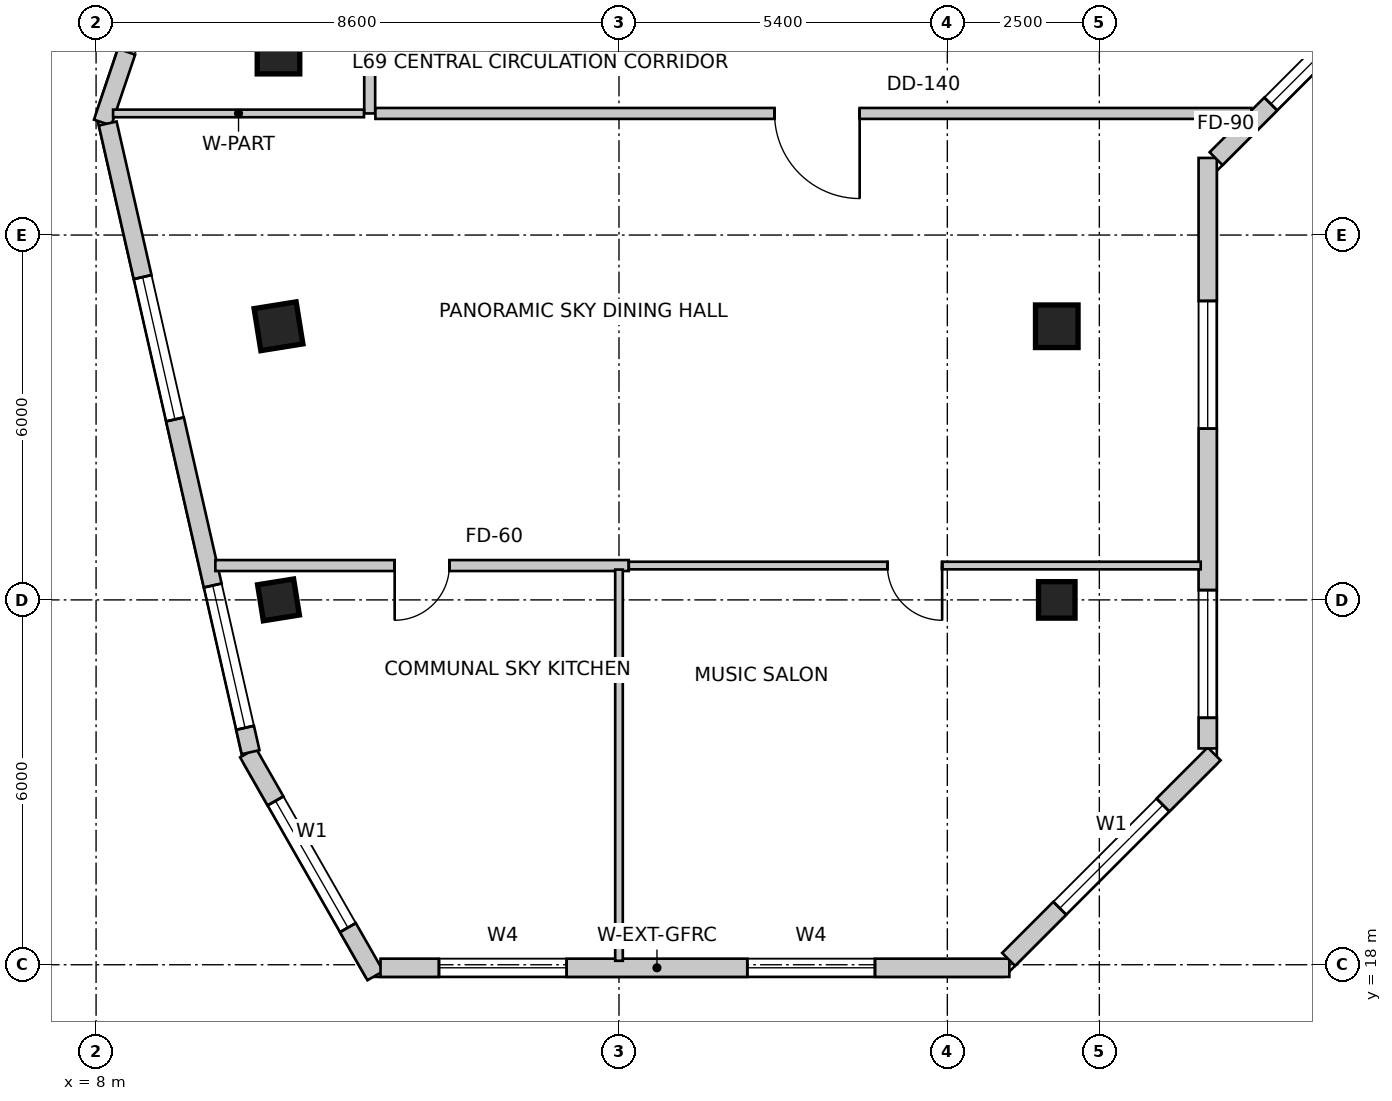
"""IFC4 building model, lengths in metres.
Left out: names, types, materials, properties, quantities, classifications, styles, units other than length and angle.
Written with IfcOpenShell. Run it as: python <this file> out.ifc"""

import sys

from ifc_helpers import new_model, si_unit, direction, frame, frame_2d, origin, origin_2d, place, context, subcontext, project, spatial, rectangle, extrude, source, transform, mapped, element, fill, save


model = new_model("IFC4")
c1 = context("Model", 3, precision=1e-05, world=origin(), true_north=direction((0.0, 1.0)))
c2 = subcontext(c1, "Body", "Model", "MODEL_VIEW")
j1 = project(units=[si_unit("LENGTHUNIT", "METRE"), si_unit("PLANEANGLEUNIT", "RADIAN")], contexts=[c1])
p1 = place(None, origin())
s1 = spatial("IfcSite", under=j1, at=p1, CompositionType="ELEMENT")
p2 = place(p1, origin())
s2 = spatial("IfcBuilding", under=s1, at=p2, CompositionType="ELEMENT")
p3 = place(p2, frame((0.0, 0.0, 270.9)))
s3 = spatial("IfcBuildingStorey", under=s2, at=p3, CompositionType="ELEMENT", Elevation=270.9)
m1 = source(origin(), c2, "Body", "SweptSolid", [
    extrude(rectangle(XDim=0.7, YDim=0.7, at=origin_2d()), origin(), (0.0, 0.0, 1.0), 3.6),
])
for number, where, z_axis, x_axis in (
    (1, (11.0, 33.0, 0.0), (0.0, 0.0, 1.0), (1.0, 0.0, 0.0)),
    (2, (11.0, 28.5, 0.0), (0.0, 0.0, 1.0), (0.158, -0.987, 0.0)),
):
    element("IfcColumn", number, at=place(p3, frame(where, z_axis=z_axis, x_axis=x_axis)), inside=s3, PredefinedType="COLUMN", context=c2, shape_type="MappedRepresentation", body=[
        mapped(m1, transform((0.0, 0.0, 0.0), scale=1.0)),
    ])
m2 = source(origin(), c2, "Body", "SweptSolid", [
    extrude(rectangle(XDim=0.6, YDim=0.6, at=origin_2d()), origin(), (0.0, 0.0, 1.0), 3.6),
])
p4 = place(p3, frame((11.0, 24.0, 0.0), z_axis=(0.0, 0.0, 1.0), x_axis=(0.158158067254, -0.987413806751, 0.0)))
e3 = element("IfcColumn", 3, at=p4, inside=s3, PredefinedType="COLUMN", context=c2, shape_type="MappedRepresentation", body=[
    mapped(m2, transform((0.0, 0.0, 0.0), scale=1.0)),
])
p5 = place(p3, frame((23.8, 28.5, 0.0), z_axis=(0.0, 0.0, 1.0), x_axis=(1.0, 0.0, 0.0)))
e4 = element("IfcColumn", 4, at=p5, inside=s3, PredefinedType="COLUMN", context=c2, shape_type="MappedRepresentation", body=[
    mapped(m1, transform((0.0, 0.0, 0.0), scale=1.0)),
])
p6 = place(p3, frame((23.8, 24.0, 0.0), z_axis=(0.0, 0.0, 1.0), x_axis=(1.0, 0.0, 0.0)))
e5 = element("IfcColumn", 5, at=p6, inside=s3, PredefinedType="COLUMN", context=c2, shape_type="MappedRepresentation", body=[
    mapped(m2, transform((0.0, 0.0, 0.0), scale=1.0)),
])
p7 = place(p3, frame((10.499, 21.485, 0.0), z_axis=(0.0, 0.0, 1.0), x_axis=(0.496163848656, -0.868228907194, 0.0)))
e6 = element("IfcWall", 6, at=p7, inside=s3, PredefinedType="SOLIDWALL", context=c2, shape_type="SweptSolid", body=[
    extrude(rectangle(XDim=4.222, YDim=0.3, at=frame_2d((2.111, 0.0))), origin(), (0.0, 0.0, 1.0), 3.35),
])
m3 = source(origin(), c2, "Body", "SweptSolid", [
    extrude(rectangle(XDim=2.4, YDim=2.2, at=frame_2d((1.2, 1.1))), frame((0.0, 0.16, 0.0), z_axis=(0.0, -1.0, 0.0), x_axis=(1.0, 0.0, 0.0)), (0.0, 0.0, 1.0), 0.32),
])
p8 = place(p7, frame((0.911, 0.0, 0.85)))
e7 = element("IfcOpeningElement", 7, at=p8, cuts=e6, PredefinedType="OPENING", context=c2, shape_type="MappedRepresentation", body=[
    mapped(m3, transform((0.0, 0.0, 0.0), scale=1.0)),
])
p9 = place(p3, frame((12.678, 17.95, 0.0), z_axis=(0.0, 0.0, 1.0), x_axis=(1.0, 0.0, 0.0)))
e8 = element("IfcWall", 8, at=p9, inside=s3, PredefinedType="SOLIDWALL", context=c2, shape_type="SweptSolid", body=[
    extrude(rectangle(XDim=10.342, YDim=0.3, at=frame_2d((5.171, 0.0))), origin(), (0.0, 0.0, 1.0), 3.35),
])
m4 = source(origin(), c2, "Body", "SweptSolid", [
    extrude(rectangle(XDim=2.1, YDim=2.0, at=frame_2d((1.05, 1.0))), frame((0.0, 0.16, 0.0), z_axis=(0.0, -1.0, 0.0), x_axis=(1.0, 0.0, 0.0)), (0.0, 0.0, 1.0), 0.32),
])
p10 = place(p9, frame((0.961, 0.0, 0.85)))
e9 = element("IfcOpeningElement", 9, at=p10, cuts=e8, PredefinedType="OPENING", context=c2, shape_type="MappedRepresentation", body=[
    mapped(m4, transform((0.0, 0.0, 0.0), scale=1.0)),
])
p11 = place(p9, frame((6.032, 0.0, 0.85)))
e10 = element("IfcOpeningElement", 10, at=p11, cuts=e8, PredefinedType="OPENING", context=c2, shape_type="MappedRepresentation", body=[
    mapped(m4, transform((0.0, 0.0, 0.0), scale=1.0)),
])
p12 = place(p3, frame((23.008, 18.088, 0.0), z_axis=(0.0, 0.0, 1.0), x_axis=(0.707106781187, 0.707106781187, 0.0)))
e11 = element("IfcWall", 11, at=p12, inside=s3, PredefinedType="SOLIDWALL", context=c2, shape_type="SweptSolid", body=[
    extrude(rectangle(XDim=4.781, YDim=0.3, at=frame_2d((2.39, 0.0))), origin(), (0.0, 0.0, 1.0), 3.35),
])
p13 = place(p12, frame((1.19, 0.0, 0.85)))
e12 = element("IfcOpeningElement", 12, at=p13, cuts=e11, PredefinedType="OPENING", context=c2, shape_type="MappedRepresentation", body=[
    mapped(m3, transform((0.0, 0.0, 0.0), scale=1.0)),
])
p14 = place(p3, frame((26.282, 21.557, 0.0), z_axis=(0.0, 0.0, 1.0), x_axis=(0.0, 1.0, 0.0)))
e13 = element("IfcWall", 13, at=p14, inside=s3, PredefinedType="SOLIDWALL", context=c2, shape_type="SweptSolid", body=[
    extrude(rectangle(XDim=9.711, YDim=0.3, at=frame_2d((4.855, 0.0))), origin(), (0.0, 0.0, 1.0), 3.35),
])
p15 = place(p14, frame((0.504, 0.0, 0.85)))
e14 = element("IfcOpeningElement", 14, at=p15, cuts=e13, PredefinedType="OPENING", context=c2, shape_type="MappedRepresentation", body=[
    mapped(m4, transform((0.0, 0.0, 0.0), scale=1.0)),
])
p16 = place(p14, frame((5.259, 0.0, 0.85)))
e15 = element("IfcOpeningElement", 15, at=p16, cuts=e13, PredefinedType="OPENING", context=c2, shape_type="MappedRepresentation", body=[
    mapped(m4, transform((0.0, 0.0, 0.0), scale=1.0)),
])
p17 = place(p3, frame((26.42, 31.256, 0.0), z_axis=(0.0, 0.0, 1.0), x_axis=(0.707106781187, 0.707106781187, 0.0)))
e16 = element("IfcWall", 16, at=p17, inside=s3, PredefinedType="SOLIDWALL", context=c2, shape_type="SweptSolid", body=[
    extrude(rectangle(XDim=2.907, YDim=0.3, at=frame_2d((1.454, 0.0))), origin(), (0.0, 0.0, 1.0), 3.35),
])
m5 = source(origin(), c2, "Body", "SweptSolid", [
    extrude(rectangle(XDim=1.2, YDim=1.6, at=frame_2d((0.6, 0.8))), frame((0.0, 0.16, 0.0), z_axis=(0.0, -1.0, 0.0), x_axis=(1.0, 0.0, 0.0)), (0.0, 0.0, 1.0), 0.32),
])
p18 = place(p17, frame((1.272, 0.0, 0.85)))
e17 = element("IfcOpeningElement", 17, at=p18, cuts=e16, PredefinedType="OPENING", context=c2, shape_type="MappedRepresentation", body=[
    mapped(m5, transform((0.0, 0.0, 0.0), scale=1.0)),
])
p19 = place(p3, frame((8.501, 33.015, 0.0), z_axis=(0.0, 0.0, 1.0), x_axis=(-0.319916718913, -0.94744566755, 0.0)))
e18 = element("IfcWall", 18, at=p19, inside=s3, PredefinedType="SOLIDWALL", context=c2, shape_type="SweptSolid", body=[
    extrude(rectangle(XDim=1.23, YDim=0.3, at=frame_2d((0.615, 0.0))), origin(), (0.0, 0.0, 1.0), 3.35),
])
p20 = place(p3, frame((8.191, 31.834, 0.0), z_axis=(0.0, 0.0, 1.0), x_axis=(0.221636032737, -0.975129462683, 0.0)))
e19 = element("IfcWall", 19, at=p20, inside=s3, PredefinedType="SOLIDWALL", context=c2, shape_type="SweptSolid", body=[
    extrude(rectangle(XDim=10.602, YDim=0.3, at=frame_2d((5.301, 0.0))), origin(), (0.0, 0.0, 1.0), 3.35),
])
p21 = place(p20, frame((2.59, 0.0, 0.85)))
e20 = element("IfcOpeningElement", 20, at=p21, cuts=e19, PredefinedType="OPENING", context=c2, shape_type="MappedRepresentation", body=[
    mapped(m3, transform((0.0, 0.0, 0.0), scale=1.0)),
])
p22 = place(p20, frame((7.791, 0.0, 0.85)))
e21 = element("IfcOpeningElement", 21, at=p22, cuts=e19, PredefinedType="OPENING", context=c2, shape_type="MappedRepresentation", body=[
    mapped(m3, transform((0.0, 0.0, 0.0), scale=1.0)),
])
p23 = place(p3, frame((12.5, 32.0, 0.0), z_axis=(0.0, 0.0, 1.0), x_axis=(0.0, 1.0, 0.0)))
e22 = element("IfcWall", 22, at=p23, inside=s3, PredefinedType="PARTITIONING", context=c2, shape_type="SweptSolid", body=[
    extrude(rectangle(XDim=1.556, YDim=0.18, at=frame_2d((0.778, 0.0))), origin(), (0.0, 0.0, 1.0), 2.935),
])
p24 = place(p3, frame((27.001, 32.0, 0.0), z_axis=(0.0, 0.0, 1.0), x_axis=(-1.0, 0.0, 0.0)))
e23 = element("IfcWall", 23, at=p24, inside=s3, PredefinedType="PARTITIONING", context=c2, shape_type="SweptSolid", body=[
    extrude(rectangle(XDim=14.407, YDim=0.18, at=frame_2d((7.204, 0.0))), origin(), (0.0, 0.0, 1.0), 2.935),
])
m6 = source(origin(), c2, "Body", "SweptSolid", [
    extrude(rectangle(XDim=1.4, YDim=2.15, at=frame_2d((0.7, 1.075))), frame((0.0, 0.1, 0.0), z_axis=(0.0, -1.0, 0.0), x_axis=(1.0, 0.0, 0.0)), (0.0, 0.0, 1.0), 0.2),
])
p25 = place(p24, frame((6.443, 0.0, 0.0)))
e24 = element("IfcOpeningElement", 24, at=p25, cuts=e23, PredefinedType="OPENING", context=c2, shape_type="MappedRepresentation", body=[
    mapped(m6, transform((0.0, 0.0, 0.0), scale=1.0)),
])
p26 = place(p3, frame((12.406, 32.0, 0.0), z_axis=(0.0, 0.0, 1.0), x_axis=(-1.0, 0.0, 0.0)))
e25 = element("IfcWall", 25, at=p26, inside=s3, PredefinedType="PARTITIONING", context=c2, shape_type="SweptSolid", body=[
    extrude(rectangle(XDim=4.126, YDim=0.125, at=frame_2d((2.063, 0.0))), origin(), (0.0, 0.0, 1.0), 2.642),
])
p27 = place(p3, frame((16.76, 24.565, 0.0), z_axis=(0.0, 0.0, 1.0), x_axis=(-1.0, 0.0, 0.0)))
e26 = element("IfcWall", 26, at=p27, inside=s3, PredefinedType="PARTITIONING", context=c2, shape_type="SweptSolid", body=[
    extrude(rectangle(XDim=6.798, YDim=0.18, at=frame_2d((3.399, 0.0))), origin(), (0.0, 0.0, 1.0), 2.642),
])
m7 = source(origin(), c2, "Body", "SweptSolid", [
    extrude(rectangle(XDim=0.9, YDim=2.15, at=frame_2d((0.45, 1.075))), frame((0.0, 0.1, 0.0), z_axis=(0.0, -1.0, 0.0), x_axis=(1.0, 0.0, 0.0)), (0.0, 0.0, 1.0), 0.2),
])
p28 = place(p27, frame((2.949, 0.0, 0.0)))
e27 = element("IfcOpeningElement", 27, at=p28, cuts=e26, PredefinedType="OPENING", context=c2, shape_type="MappedRepresentation", body=[
    mapped(m7, transform((0.0, 0.0, 0.0), scale=1.0)),
])
p29 = place(p3, frame((26.167, 24.565, 0.0), z_axis=(0.0, 0.0, 1.0), x_axis=(-1.0, 0.0, 0.0)))
e28 = element("IfcWall", 28, at=p29, inside=s3, PredefinedType="PARTITIONING", context=c2, shape_type="SweptSolid", body=[
    extrude(rectangle(XDim=9.405, YDim=0.125, at=frame_2d((4.703, 0.0))), origin(), (0.0, 0.0, 1.0), 2.642),
])
m8 = source(origin(), c2, "Body", "SweptSolid", [
    extrude(rectangle(XDim=0.9, YDim=2.15, at=frame_2d((0.45, 1.075))), frame((0.0, 0.073, 0.0), z_axis=(0.0, -1.0, 0.0), x_axis=(1.0, 0.0, 0.0)), (0.0, 0.0, 1.0), 0.145),
])
p30 = place(p29, frame((4.252, 0.0, 0.0)))
e29 = element("IfcOpeningElement", 29, at=p30, cuts=e28, PredefinedType="OPENING", context=c2, shape_type="MappedRepresentation", body=[
    mapped(m8, transform((0.0, 0.0, 0.0), scale=1.0)),
])
p31 = place(p3, frame((16.6, 24.499, 0.0), z_axis=(0.0, 0.0, 1.0), x_axis=(0.0, -1.0, 0.0)))
e30 = element("IfcWall", 30, at=p31, inside=s3, PredefinedType="PARTITIONING", context=c2, shape_type="SweptSolid", body=[
    extrude(rectangle(XDim=6.434, YDim=0.125, at=frame_2d((3.217, 0.0))), origin(), (0.0, 0.0, 1.0), 2.979),
])
m9 = source(origin(), c2, "Body", "SweptSolid", [
    extrude(rectangle(XDim=2.4, YDim=2.2, at=frame_2d((1.2, 1.1))), frame((0.0, -0.015, 0.0), z_axis=(0.0, -1.0, 0.0), x_axis=(1.0, 0.0, 0.0)), (0.0, 0.0, 1.0), 0.06),
])
p32 = place(p8, origin())
e31 = element("IfcWindow", 31, at=p32, inside=s3, PartitioningType="SINGLE_PANEL", PredefinedType="WINDOW", context=c2, shape_type="MappedRepresentation", body=[
    mapped(m9, transform((0.0, 0.0, 0.0), scale=1.0)),
])
fill(e7, e31)
m10 = source(origin(), c2, "Body", "SweptSolid", [
    extrude(rectangle(XDim=2.1, YDim=2.0, at=frame_2d((1.05, 1.0))), frame((0.0, -0.015, 0.0), z_axis=(0.0, -1.0, 0.0), x_axis=(1.0, 0.0, 0.0)), (0.0, 0.0, 1.0), 0.06),
])
p33 = place(p10, origin())
e32 = element("IfcWindow", 32, at=p33, inside=s3, PartitioningType="SINGLE_PANEL", PredefinedType="WINDOW", context=c2, shape_type="MappedRepresentation", body=[
    mapped(m10, transform((0.0, 0.0, 0.0), scale=1.0)),
])
fill(e9, e32)
p34 = place(p11, origin())
e33 = element("IfcWindow", 33, at=p34, inside=s3, PartitioningType="SINGLE_PANEL", PredefinedType="WINDOW", context=c2, shape_type="MappedRepresentation", body=[
    mapped(m10, transform((0.0, 0.0, 0.0), scale=1.0)),
])
fill(e10, e33)
p35 = place(p13, origin())
e34 = element("IfcWindow", 34, at=p35, inside=s3, PartitioningType="SINGLE_PANEL", PredefinedType="WINDOW", context=c2, shape_type="MappedRepresentation", body=[
    mapped(m9, transform((0.0, 0.0, 0.0), scale=1.0)),
])
fill(e12, e34)
p36 = place(p15, origin())
e35 = element("IfcWindow", 35, at=p36, inside=s3, PartitioningType="SINGLE_PANEL", PredefinedType="WINDOW", context=c2, shape_type="MappedRepresentation", body=[
    mapped(m10, transform((0.0, 0.0, 0.0), scale=1.0)),
])
fill(e14, e35)
p37 = place(p16, origin())
e36 = element("IfcWindow", 36, at=p37, inside=s3, PartitioningType="SINGLE_PANEL", PredefinedType="WINDOW", context=c2, shape_type="MappedRepresentation", body=[
    mapped(m10, transform((0.0, 0.0, 0.0), scale=1.0)),
])
fill(e15, e36)
m11 = source(origin(), c2, "Body", "SweptSolid", [
    extrude(rectangle(XDim=1.2, YDim=1.6, at=frame_2d((0.6, 0.8))), frame((0.0, -0.015, 0.0), z_axis=(0.0, -1.0, 0.0), x_axis=(1.0, 0.0, 0.0)), (0.0, 0.0, 1.0), 0.06),
])
p38 = place(p18, origin())
e37 = element("IfcWindow", 37, at=p38, inside=s3, PartitioningType="SINGLE_PANEL", PredefinedType="WINDOW", context=c2, shape_type="MappedRepresentation", body=[
    mapped(m11, transform((0.0, 0.0, 0.0), scale=1.0)),
])
fill(e17, e37)
p39 = place(p21, origin())
e38 = element("IfcWindow", 38, at=p39, inside=s3, PartitioningType="SINGLE_PANEL", PredefinedType="WINDOW", context=c2, shape_type="MappedRepresentation", body=[
    mapped(m9, transform((0.0, 0.0, 0.0), scale=1.0)),
])
fill(e20, e38)
p40 = place(p22, origin())
e39 = element("IfcWindow", 39, at=p40, inside=s3, PartitioningType="SINGLE_PANEL", PredefinedType="WINDOW", context=c2, shape_type="MappedRepresentation", body=[
    mapped(m9, transform((0.0, 0.0, 0.0), scale=1.0)),
])
fill(e21, e39)
m12 = source(origin(), c2, "Body", "SweptSolid", [
    extrude(rectangle(XDim=1.4, YDim=2.15, at=frame_2d((0.7, 1.075))), frame((0.0, 0.025, 0.0), z_axis=(0.0, -1.0, 0.0), x_axis=(1.0, 0.0, 0.0)), (0.0, 0.0, 1.0), 0.05),
])
p41 = place(p25, origin())
e40 = element("IfcDoor", 40, at=p41, inside=s3, OperationType="SINGLE_SWING_LEFT", PredefinedType="DOOR", context=c2, shape_type="MappedRepresentation", body=[
    mapped(m12, transform((0.0, 0.0, 0.0), scale=1.0)),
])
fill(e24, e40)
m13 = source(origin(), c2, "Body", "SweptSolid", [
    extrude(rectangle(XDim=0.9, YDim=2.15, at=frame_2d((0.45, 1.075))), frame((0.0, 0.025, 0.0), z_axis=(0.0, -1.0, 0.0), x_axis=(1.0, 0.0, 0.0)), (0.0, 0.0, 1.0), 0.05),
])
p42 = place(p28, origin())
e41 = element("IfcDoor", 41, at=p42, inside=s3, OperationType="SINGLE_SWING_RIGHT", PredefinedType="DOOR", context=c2, shape_type="MappedRepresentation", body=[
    mapped(m13, transform((0.0, 0.0, 0.0), scale=1.0)),
])
fill(e27, e41)
m14 = source(origin(), c2, "Body", "SweptSolid", [
    extrude(rectangle(XDim=0.9, YDim=2.15, at=frame_2d((0.45, 1.075))), frame((0.0, 0.025, 0.0), z_axis=(0.0, -1.0, 0.0), x_axis=(1.0, 0.0, 0.0)), (0.0, 0.0, 1.0), 0.05),
])
p43 = place(p30, origin())
e42 = element("IfcDoor", 42, at=p43, inside=s3, OperationType="SINGLE_SWING_LEFT", PredefinedType="DOOR", context=c2, shape_type="MappedRepresentation", body=[
    mapped(m14, transform((0.0, 0.0, 0.0), scale=1.0)),
])
fill(e29, e42)
save(model, sys.argv[1])
